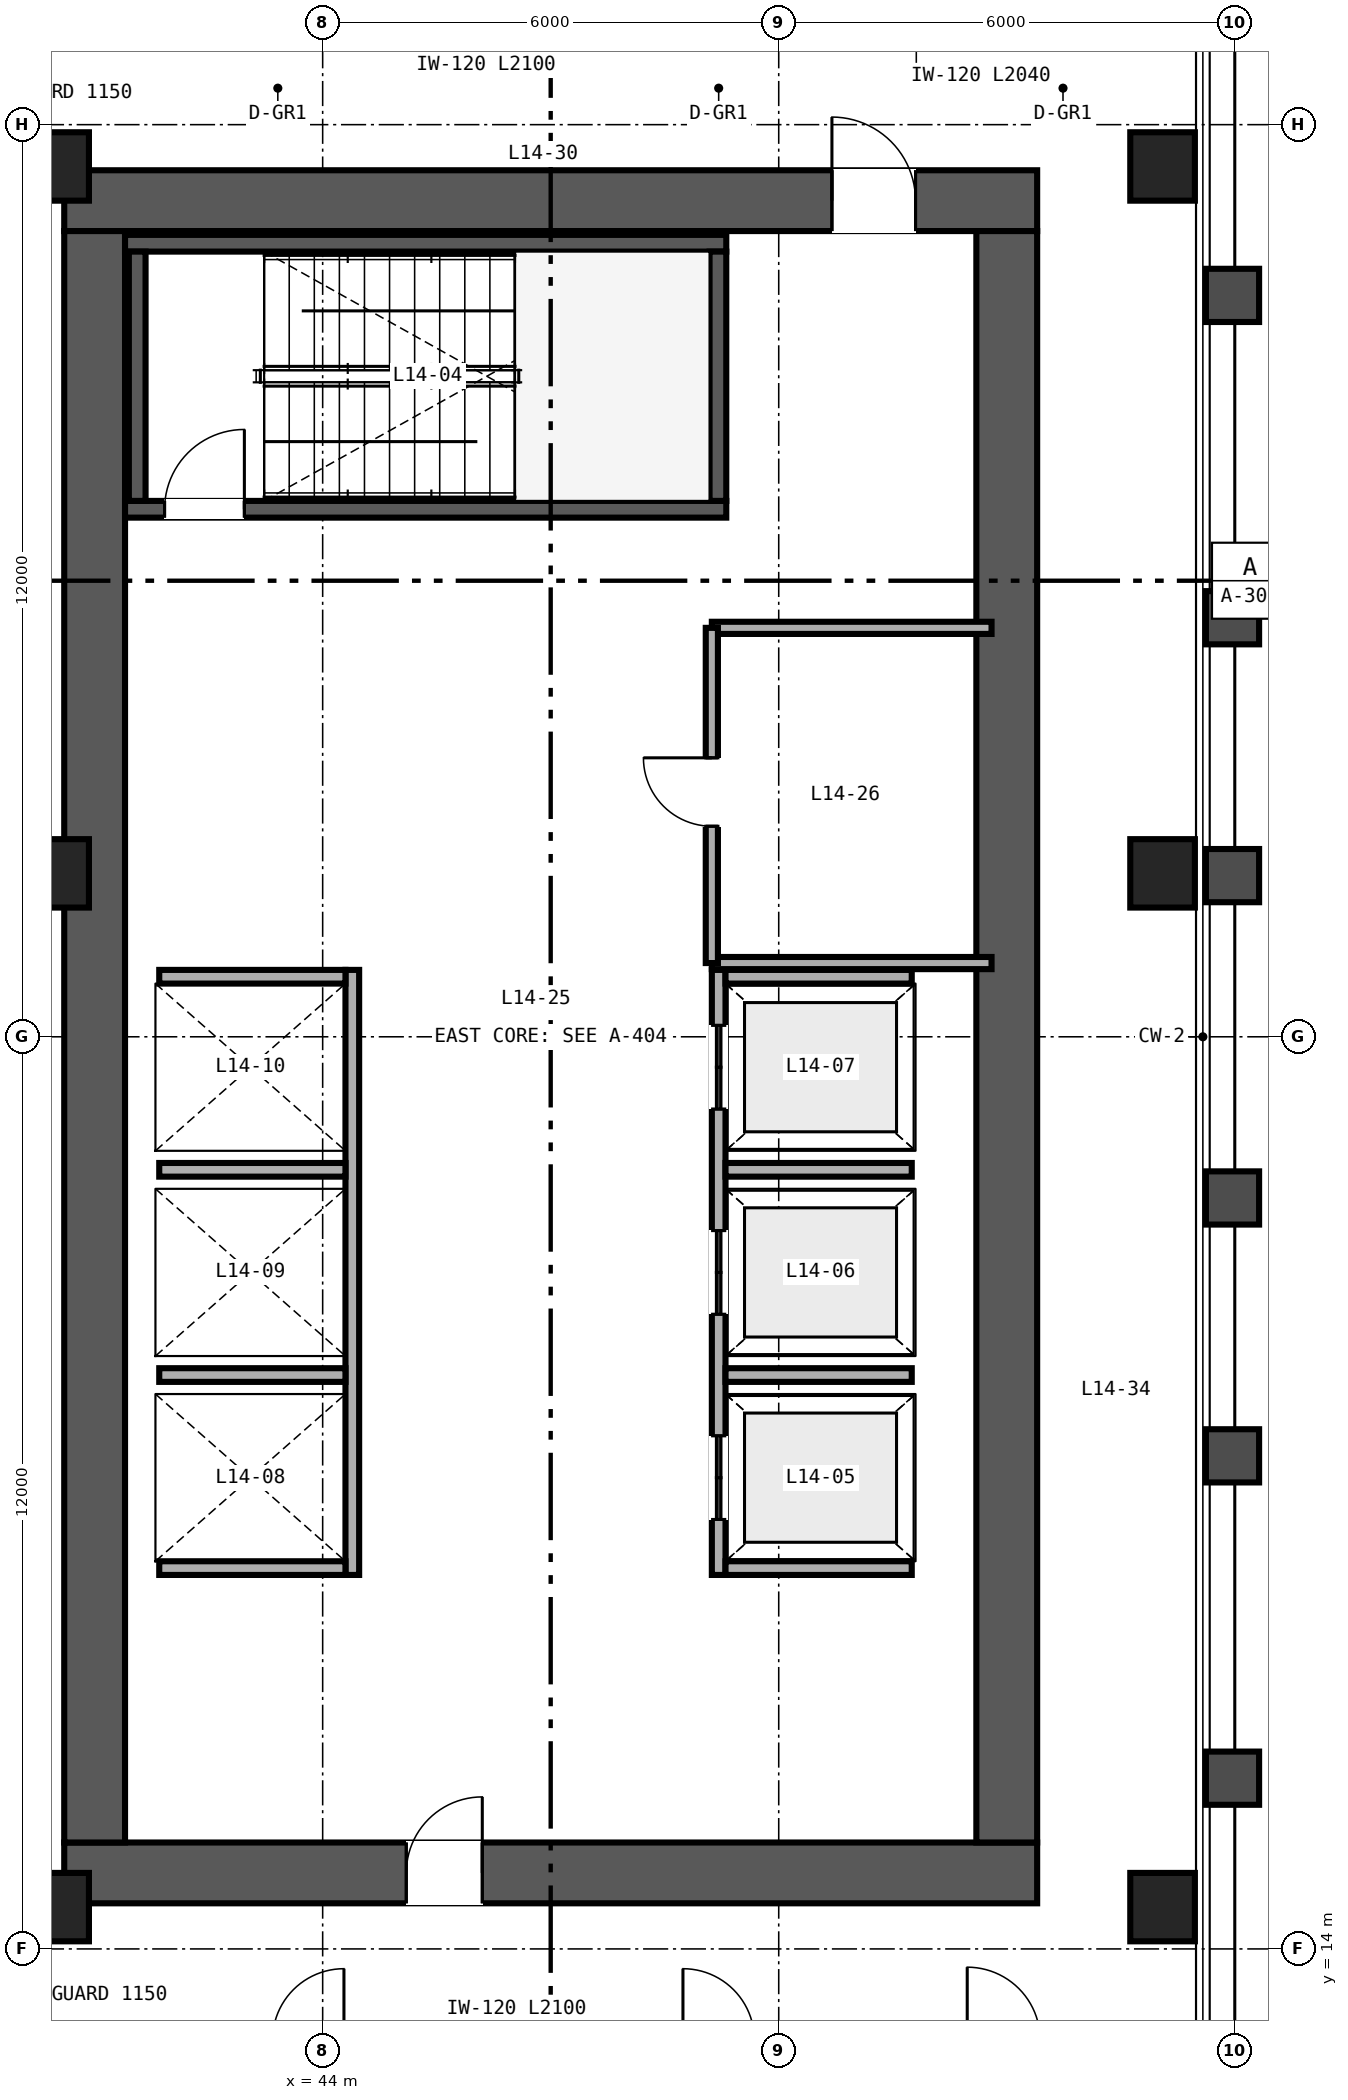
"""IFC4 building model, lengths in metres.
Left out: names, types, materials, properties, quantities, classifications, styles, units other than length and angle.
Written with IfcOpenShell. Run it as: python <this file> out.ifc"""

import sys

from ifc_helpers import new_model, si_unit, direction, frame, frame_2d, origin, origin_2d, place, context, subcontext, project, spatial, rectangle, hollow_rectangle, extrude, source, transform, mapped, element, fill, save


model = new_model("IFC4")
c1 = context("Model", 3, precision=1e-05, world=origin(), true_north=direction((0.0, 1.0)))
c2 = subcontext(c1, "Body", "Model", "MODEL_VIEW")
j1 = project(units=[si_unit("LENGTHUNIT", "METRE"), si_unit("PLANEANGLEUNIT", "RADIAN")], contexts=[c1])
p1 = place(None, origin())
s1 = spatial("IfcSite", under=j1, at=p1, CompositionType="ELEMENT")
p2 = place(p1, origin())
s2 = spatial("IfcBuilding", under=s1, at=p2, CompositionType="ELEMENT")
p3 = place(p2, frame((0.0, 0.0, 60.0)))
s3 = spatial("IfcBuildingStorey", under=s2, at=p3, CompositionType="ELEMENT", Elevation=60.0)
p4 = place(p3, frame((40.6, 15.0, 0.0), z_axis=(0.0, 0.0, 1.0), x_axis=(1.0, 0.0, 0.0)))
e1 = element("IfcWall", 1, at=p4, inside=s3, PredefinedType="SHEAR", context=c2, shape_type="SweptSolid", body=[
    extrude(rectangle(XDim=12.8, YDim=0.8, at=frame_2d((6.4, 0.0))), origin(), (0.0, 0.0, 1.0), 3.35),
])
p5 = place(p4, frame((4.5, 0.0, 0.0)))
e2 = element("IfcOpeningElement", 2, at=p5, cuts=e1, PredefinedType="OPENING", context=c2, shape_type="SweptSolid", body=[
    extrude(rectangle(XDim=1.0, YDim=2.15, at=frame_2d((0.5, 1.075))), frame((0.0, 0.41, 0.0), z_axis=(0.0, -1.0, 0.0), x_axis=(1.0, 0.0, 0.0)), (0.0, 0.0, 1.0), 0.82),
])
p6 = place(p3, frame((40.6, 37.0, 0.0), z_axis=(0.0, 0.0, 1.0), x_axis=(1.0, 0.0, 0.0)))
e3 = element("IfcWall", 3, at=p6, inside=s3, PredefinedType="SHEAR", context=c2, shape_type="SweptSolid", body=[
    extrude(rectangle(XDim=12.8, YDim=0.8, at=frame_2d((6.4, 0.0))), origin(), (0.0, 0.0, 1.0), 3.35),
])
p7 = place(p6, frame((10.1, 0.0, 0.0)))
e4 = element("IfcOpeningElement", 4, at=p7, cuts=e3, PredefinedType="OPENING", context=c2, shape_type="SweptSolid", body=[
    extrude(rectangle(XDim=1.1, YDim=2.15, at=frame_2d((0.55, 1.075))), frame((0.0, 0.41, 0.0), z_axis=(0.0, -1.0, 0.0), x_axis=(1.0, 0.0, 0.0)), (0.0, 0.0, 1.0), 0.82),
])
for number, where, z_axis, x_axis in (
    (5, (41.0, 15.4, 0.0), (0.0, 0.0, 1.0), (0.0, 1.0, 0.0)),
    (6, (53.0, 15.4, 0.0), (0.0, 0.0, 1.0), (0.0, 1.0, 0.0)),
):
    element("IfcWall", number, at=place(p3, frame(where, z_axis=z_axis, x_axis=x_axis)), inside=s3, PredefinedType="SHEAR", context=c2, shape_type="SweptSolid", body=[
        extrude(rectangle(XDim=21.2, YDim=0.8, at=frame_2d((10.6, 0.0))), origin(), (0.0, 0.0, 1.0), 3.35),
    ])
p8 = place(p3, frame((41.4, 32.94, 0.0), z_axis=(0.0, 0.0, 1.0), x_axis=(1.0, 0.0, 0.0)))
e7 = element("IfcWall", 7, at=p8, inside=s3, PredefinedType="SHEAR", context=c2, shape_type="SweptSolid", body=[
    extrude(rectangle(XDim=7.91, YDim=0.22, at=frame_2d((3.955, 0.0))), origin(), (0.0, 0.0, 1.0), 3.4),
])
p9 = place(p8, frame((0.52, 0.0, 0.0)))
e8 = element("IfcOpeningElement", 8, at=p9, cuts=e7, PredefinedType="OPENING", context=c2, shape_type="SweptSolid", body=[
    extrude(rectangle(XDim=1.05, YDim=2.15, at=frame_2d((0.525, 1.075))), frame((0.0, 0.12, 0.0), z_axis=(0.0, -1.0, 0.0), x_axis=(1.0, 0.0, 0.0)), (0.0, 0.0, 1.0), 0.24),
])
p10 = place(p3, frame((41.4, 36.44, 0.0), z_axis=(0.0, 0.0, 1.0), x_axis=(1.0, 0.0, 0.0)))
e9 = element("IfcWall", 9, at=p10, inside=s3, PredefinedType="SHEAR", context=c2, shape_type="SweptSolid", body=[
    extrude(rectangle(XDim=7.91, YDim=0.22, at=frame_2d((3.955, 0.0))), origin(), (0.0, 0.0, 1.0), 3.4),
])
for number, where, z_axis, x_axis in (
    (10, (41.56, 33.05, 0.0), (0.0, 0.0, 1.0), (0.0, 1.0, 0.0)),
    (11, (49.2, 33.05, 0.0), (0.0, 0.0, 1.0), (0.0, 1.0, 0.0)),
):
    element("IfcWall", number, at=place(p3, frame(where, z_axis=z_axis, x_axis=x_axis)), inside=s3, PredefinedType="SHEAR", context=c2, shape_type="SweptSolid", body=[
        extrude(rectangle(XDim=3.28, YDim=0.22, at=frame_2d((1.64, 0.0))), origin(), (0.0, 0.0, 1.0), 3.4),
    ])
m1 = source(origin(), c2, "Body", "SweptSolid", [
    extrude(hollow_rectangle(XDim=0.85, YDim=0.9, WallThickness=0.04, at=origin_2d()), origin(), (0.0, 0.0, 1.0), 3.35),
])
for number, where, z_axis, x_axis in (
    (12, (40.5, 14.55, 0.0), (0.0, 0.0, 1.0), (1.0, 0.0, 0.0)),
    (13, (55.05, 14.55, 0.0), (0.0, 0.0, 1.0), (1.0, 0.0, 0.0)),
    (14, (40.5, 28.15, 0.0), (0.0, 0.0, 1.0), (1.0, 0.0, 0.0)),
    (15, (55.05, 28.15, 0.0), (0.0, 0.0, 1.0), (1.0, 0.0, 0.0)),
    (16, (40.5, 37.45, 0.0), (0.0, 0.0, 1.0), (1.0, 0.0, 0.0)),
    (17, (55.05, 37.45, 0.0), (0.0, 0.0, 1.0), (1.0, 0.0, 0.0)),
):
    element("IfcColumn", number, at=place(p3, frame(where, z_axis=z_axis, x_axis=x_axis)), inside=s3, PredefinedType="COLUMN", context=c2, shape_type="MappedRepresentation", body=[
        mapped(m1, transform((0.0, 0.0, 0.0), scale=1.0)),
    ])
p11 = place(p3, frame((49.21, 18.92, 0.0), z_axis=(0.0, 0.0, 1.0), x_axis=(0.0, 1.0, 0.0)))
e18 = element("IfcWall", 18, at=p11, inside=s3, PredefinedType="SOLIDWALL", context=c2, shape_type="SweptSolid", body=[
    extrude(rectangle(XDim=7.96, YDim=0.18, at=frame_2d((3.98, 0.0))), origin(), (0.0, 0.0, 1.0), 3.35),
])
p12 = place(p11, frame((0.73, 0.0, 0.0)))
e19 = element("IfcOpeningElement", 19, at=p12, cuts=e18, PredefinedType="OPENING", context=c2, shape_type="SweptSolid", body=[
    extrude(rectangle(XDim=1.1, YDim=2.2, at=frame_2d((0.55, 1.1))), frame((0.0, 0.1, 0.0), z_axis=(0.0, -1.0, 0.0), x_axis=(1.0, 0.0, 0.0)), (0.0, 0.0, 1.0), 0.2),
])
p13 = place(p11, frame((3.43, 0.0, 0.0)))
e20 = element("IfcOpeningElement", 20, at=p13, cuts=e18, PredefinedType="OPENING", context=c2, shape_type="SweptSolid", body=[
    extrude(rectangle(XDim=1.1, YDim=2.2, at=frame_2d((0.55, 1.1))), frame((0.0, 0.1, 0.0), z_axis=(0.0, -1.0, 0.0), x_axis=(1.0, 0.0, 0.0)), (0.0, 0.0, 1.0), 0.2),
])
p14 = place(p11, frame((6.13, 0.0, 0.0)))
e21 = element("IfcOpeningElement", 21, at=p14, cuts=e18, PredefinedType="OPENING", context=c2, shape_type="SweptSolid", body=[
    extrude(rectangle(XDim=1.1, YDim=2.2, at=frame_2d((0.55, 1.1))), frame((0.0, 0.1, 0.0), z_axis=(0.0, -1.0, 0.0), x_axis=(1.0, 0.0, 0.0)), (0.0, 0.0, 1.0), 0.2),
])
for number, where, z_axis, x_axis in (
    (22, (49.3, 19.01, 0.0), (0.0, 0.0, 1.0), (1.0, 0.0, 0.0)),
    (23, (49.3, 26.79, 0.0), (0.0, 0.0, 1.0), (1.0, 0.0, 0.0)),
    (24, (49.3, 21.55, 0.0), (0.0, 0.0, 1.0), (1.0, 0.0, 0.0)),
    (25, (49.3, 24.25, 0.0), (0.0, 0.0, 1.0), (1.0, 0.0, 0.0)),
):
    element("IfcWall", number, at=place(p3, frame(where, z_axis=z_axis, x_axis=x_axis)), inside=s3, PredefinedType="SOLIDWALL", context=c2, shape_type="SweptSolid", body=[
        extrude(rectangle(XDim=2.45, YDim=0.18, at=frame_2d((1.225, 0.0))), origin(), (0.0, 0.0, 1.0), 3.35),
    ])
p15 = place(p3, frame((44.39, 18.92, 0.0), z_axis=(0.0, 0.0, 1.0), x_axis=(0.0, 1.0, 0.0)))
e26 = element("IfcWall", 26, at=p15, inside=s3, PredefinedType="SOLIDWALL", context=c2, shape_type="SweptSolid", body=[
    extrude(rectangle(XDim=7.96, YDim=0.18, at=frame_2d((3.98, 0.0))), origin(), (0.0, 0.0, 1.0), 3.35),
])
for number, where, z_axis, x_axis in (
    (27, (41.85, 19.01, 0.0), (0.0, 0.0, 1.0), (1.0, 0.0, 0.0)),
    (28, (41.85, 26.79, 0.0), (0.0, 0.0, 1.0), (1.0, 0.0, 0.0)),
    (29, (41.85, 21.55, 0.0), (0.0, 0.0, 1.0), (1.0, 0.0, 0.0)),
    (30, (41.85, 24.25, 0.0), (0.0, 0.0, 1.0), (1.0, 0.0, 0.0)),
):
    element("IfcWall", number, at=place(p3, frame(where, z_axis=z_axis, x_axis=x_axis)), inside=s3, PredefinedType="SOLIDWALL", context=c2, shape_type="SweptSolid", body=[
        extrude(rectangle(XDim=2.45, YDim=0.18, at=frame_2d((1.225, 0.0))), origin(), (0.0, 0.0, 1.0), 3.35),
    ])
p16 = place(p3, frame((49.12, 26.97, 0.0), z_axis=(0.0, 0.0, 1.0), x_axis=(1.0, 0.0, 0.0)))
e31 = element("IfcWall", 31, at=p16, inside=s3, PredefinedType="PARTITIONING", context=c2, shape_type="SweptSolid", body=[
    extrude(rectangle(XDim=3.68, YDim=0.16, at=frame_2d((1.84, 0.0))), origin(), (0.0, 0.0, 1.0), 3.35),
])
p17 = place(p3, frame((49.12, 31.38, 0.0), z_axis=(0.0, 0.0, 1.0), x_axis=(1.0, 0.0, 0.0)))
e32 = element("IfcWall", 32, at=p17, inside=s3, PredefinedType="PARTITIONING", context=c2, shape_type="SweptSolid", body=[
    extrude(rectangle(XDim=3.68, YDim=0.16, at=frame_2d((1.84, 0.0))), origin(), (0.0, 0.0, 1.0), 2.36),
])
p18 = place(p3, frame((49.12, 26.97, 0.0), z_axis=(0.0, 0.0, 1.0), x_axis=(0.0, 1.0, 0.0)))
e33 = element("IfcWall", 33, at=p18, inside=s3, PredefinedType="PARTITIONING", context=c2, shape_type="SweptSolid", body=[
    extrude(rectangle(XDim=4.41, YDim=0.16, at=frame_2d((2.205, 0.0))), origin(), (0.0, 0.0, 1.0), 2.36),
])
p19 = place(p18, frame((1.8, 0.0, 0.0)))
e34 = element("IfcOpeningElement", 34, at=p19, cuts=e33, PredefinedType="OPENING", context=c2, shape_type="SweptSolid", body=[
    extrude(rectangle(XDim=0.9, YDim=2.15, at=frame_2d((0.45, 1.075))), frame((0.0, 0.09, 0.0), z_axis=(0.0, -1.0, 0.0), x_axis=(1.0, 0.0, 0.0)), (0.0, 0.0, 1.0), 0.18),
])
m2 = source(origin(), c2, "Body", "SweptSolid", [
    extrude(rectangle(XDim=1.05, YDim=2.15, at=frame_2d((0.525, 1.075))), frame((0.0, 0.025, 0.0), z_axis=(0.0, -1.0, 0.0), x_axis=(1.0, 0.0, 0.0)), (0.0, 0.0, 1.0), 0.05),
])
p20 = place(p9, origin())
e35 = element("IfcDoor", 35, at=p20, inside=s3, OperationType="SINGLE_SWING_RIGHT", PredefinedType="DOOR", context=c2, shape_type="MappedRepresentation", body=[
    mapped(m2, transform((0.0, 0.0, 0.0), scale=1.0)),
])
fill(e8, e35)
m3 = source(origin(), c2, "Body", "SweptSolid", [
    extrude(rectangle(XDim=1.1, YDim=2.2, at=frame_2d((0.55, 1.1))), frame((0.0, 0.025, 0.0), z_axis=(0.0, -1.0, 0.0), x_axis=(1.0, 0.0, 0.0)), (0.0, 0.0, 1.0), 0.05),
])
p21 = place(p12, origin())
e36 = element("IfcDoor", 36, at=p21, inside=s3, OperationType="DOUBLE_DOOR_SLIDING", PredefinedType="DOOR", context=c2, shape_type="MappedRepresentation", body=[
    mapped(m3, transform((0.0, 0.0, 0.0), scale=1.0)),
])
fill(e19, e36)
p22 = place(p13, origin())
e37 = element("IfcDoor", 37, at=p22, inside=s3, OperationType="DOUBLE_DOOR_SLIDING", PredefinedType="DOOR", context=c2, shape_type="MappedRepresentation", body=[
    mapped(m3, transform((0.0, 0.0, 0.0), scale=1.0)),
])
fill(e20, e37)
p23 = place(p14, origin())
e38 = element("IfcDoor", 38, at=p23, inside=s3, OperationType="DOUBLE_DOOR_SLIDING", PredefinedType="DOOR", context=c2, shape_type="MappedRepresentation", body=[
    mapped(m3, transform((0.0, 0.0, 0.0), scale=1.0)),
])
fill(e21, e38)
m4 = source(origin(), c2, "Body", "SweptSolid", [
    extrude(rectangle(XDim=1.0, YDim=2.15, at=frame_2d((0.5, 1.075))), frame((0.0, 0.025, 0.0), z_axis=(0.0, -1.0, 0.0), x_axis=(1.0, 0.0, 0.0)), (0.0, 0.0, 1.0), 0.05),
])
p24 = place(p5, origin())
e39 = element("IfcDoor", 39, at=p24, inside=s3, OperationType="SINGLE_SWING_RIGHT", PredefinedType="DOOR", context=c2, shape_type="MappedRepresentation", body=[
    mapped(m4, transform((0.0, 0.0, 0.0), scale=1.0)),
])
fill(e2, e39)
m5 = source(origin(), c2, "Body", "SweptSolid", [
    extrude(rectangle(XDim=1.1, YDim=2.15, at=frame_2d((0.55, 1.075))), frame((0.0, 0.025, 0.0), z_axis=(0.0, -1.0, 0.0), x_axis=(1.0, 0.0, 0.0)), (0.0, 0.0, 1.0), 0.05),
])
p25 = place(p7, origin())
e40 = element("IfcDoor", 40, at=p25, inside=s3, OperationType="SINGLE_SWING_LEFT", PredefinedType="DOOR", context=c2, shape_type="MappedRepresentation", body=[
    mapped(m5, transform((0.0, 0.0, 0.0), scale=1.0)),
])
fill(e4, e40)
m6 = source(origin(), c2, "Body", "SweptSolid", [
    extrude(rectangle(XDim=0.9, YDim=2.15, at=frame_2d((0.45, 1.075))), frame((0.0, 0.025, 0.0), z_axis=(0.0, -1.0, 0.0), x_axis=(1.0, 0.0, 0.0)), (0.0, 0.0, 1.0), 0.05),
])
p26 = place(p19, origin())
e41 = element("IfcDoor", 41, at=p26, inside=s3, OperationType="SINGLE_SWING_RIGHT", PredefinedType="DOOR", context=c2, shape_type="MappedRepresentation", body=[
    mapped(m6, transform((0.0, 0.0, 0.0), scale=1.0)),
])
fill(e34, e41)
save(model, sys.argv[1])
